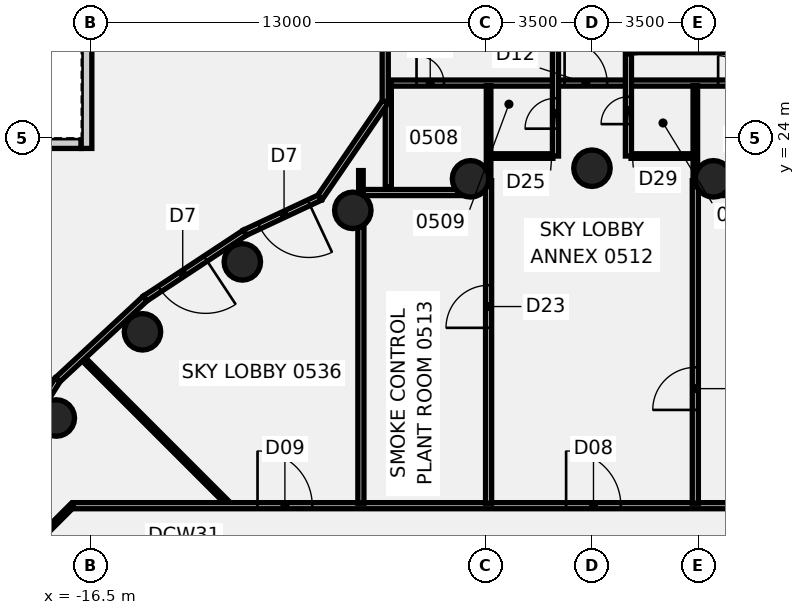
"""IFC4 building model, lengths in metres.
Left out: names, types, materials, properties, quantities, classifications, styles, units other than length and angle.
Written with IfcOpenShell. Run it as: python <this file> out.ifc"""

import sys

from ifc_helpers import new_model, si_unit, direction, frame, frame_2d, origin, origin_2d, place, context, subcontext, project, spatial, rectangle, circle, extrude, element, fill, save


model = new_model("IFC4")
c1 = context("Model", 3, precision=1e-05, world=origin(), true_north=direction((0.0, 1.0)))
c2 = subcontext(c1, "Body", "Model", "MODEL_VIEW")
j1 = project(units=[si_unit("LENGTHUNIT", "METRE"), si_unit("PLANEANGLEUNIT", "RADIAN")], contexts=[c1])
p1 = place(None, origin())
s1 = spatial("IfcSite", under=j1, at=p1, CompositionType="ELEMENT")
p2 = place(p1, origin())
s2 = spatial("IfcBuilding", under=s1, at=p2, CompositionType="ELEMENT")
p3 = place(p2, frame((0.0, 0.0, 29.5)))
s3 = spatial("IfcBuildingStorey", under=s2, at=p3, CompositionType="ELEMENT", Elevation=29.5)
for number, where, z_axis, x_axis in (
    (1, (3.994, 22.651, -0.6), (0.0, 0.0, 1.0), (1.0, 0.0, 0.0)),
    (2, (0.0, 23.0, -0.6), (0.0, 0.0, 1.0), (1.0, 0.0, 0.0)),
    (3, (-3.994, 22.651, -0.6), (0.0, 0.0, 1.0), (1.0, 0.0, 0.0)),
    (4, (-7.866, 21.613, -0.6), (0.0, 0.0, 1.0), (1.0, 0.0, 0.0)),
    (5, (-11.5, 19.919, -0.6), (0.0, 0.0, 1.0), (1.0, 0.0, 0.0)),
    (6, (-14.784, 17.619, -0.6), (0.0, 0.0, 1.0), (1.0, 0.0, 0.0)),
    (7, (-17.619, 14.784, -0.6), (0.0, 0.0, 1.0), (1.0, 0.0, 0.0)),
):
    element("IfcColumn", number, at=place(p3, frame(where, z_axis=z_axis, x_axis=x_axis)), inside=s3, PredefinedType="COLUMN", context=c2, shape_type="SweptSolid", body=[
        extrude(circle(Radius=0.6, at=origin_2d()), origin(), (0.0, 0.0, 1.0), 4.96),
    ])
p4 = place(p3, frame((-16.74, 16.74, 0.0), z_axis=(0.0, 0.0, 1.0), x_axis=(0.707106781187, -0.707106781187, 0.0)))
e8 = element("IfcWall", 8, at=p4, inside=s3, PredefinedType="PARTITIONING", context=c2, shape_type="SweptSolid", body=[
    extrude(rectangle(XDim=6.655, YDim=0.15, at=frame_2d((3.328, 0.0))), origin(), (0.0, 0.0, 1.0), 3.76),
])
p5 = place(p3, frame((-17.065, 11.9, 0.0), z_axis=(0.0, 0.0, 1.0), x_axis=(1.0, 0.0, 0.0)))
e9 = element("IfcWall", 9, at=p5, inside=s3, PredefinedType="PARTITIONING", context=c2, shape_type="SweptSolid", body=[
    extrude(rectangle(XDim=34.165, YDim=0.2, at=frame_2d((17.083, 0.0))), origin(), (0.0, 0.0, 1.0), 3.76),
])
p6 = place(p5, frame((16.215, 0.0, 0.0)))
e10 = element("IfcOpeningElement", 10, at=p6, cuts=e9, PredefinedType="OPENING", context=c2, shape_type="SweptSolid", body=[
    extrude(rectangle(XDim=1.8, YDim=2.1, at=frame_2d((0.9, 1.05))), frame((0.0, 0.11, 0.0), z_axis=(0.0, -1.0, 0.0), x_axis=(1.0, 0.0, 0.0)), (0.0, 0.0, 1.0), 0.22),
])
p7 = place(p5, frame((6.065, 0.0, 0.0)))
e11 = element("IfcOpeningElement", 11, at=p7, cuts=e9, PredefinedType="OPENING", context=c2, shape_type="SweptSolid", body=[
    extrude(rectangle(XDim=1.8, YDim=2.1, at=frame_2d((0.9, 1.05))), frame((0.0, 0.11, 0.0), z_axis=(0.0, -1.0, 0.0), x_axis=(1.0, 0.0, 0.0)), (0.0, 0.0, 1.0), 0.22),
])
p8 = place(p5, frame((31.065, 0.0, 0.0)))
e12 = element("IfcOpeningElement", 12, at=p8, cuts=e9, PredefinedType="OPENING", context=c2, shape_type="SweptSolid", body=[
    extrude(rectangle(XDim=1.8, YDim=2.1, at=frame_2d((0.9, 1.05))), frame((0.0, 0.11, 0.0), z_axis=(0.0, -1.0, 0.0), x_axis=(1.0, 0.0, 0.0)), (0.0, 0.0, 1.0), 0.22),
])
p9 = place(p3, frame((-7.54, 22.2, 0.0), z_axis=(0.0, 0.0, 1.0), x_axis=(1.0, 0.0, 0.0)))
e13 = element("IfcWall", 13, at=p9, inside=s3, PredefinedType="PARTITIONING", context=c2, shape_type="SweptSolid", body=[
    extrude(rectangle(XDim=3.413, YDim=0.2, at=frame_2d((1.707, 0.0))), origin(), (0.0, 0.0, 1.0), 3.76),
])
p10 = place(p3, frame((4.127, 22.2, 0.0), z_axis=(0.0, 0.0, 1.0), x_axis=(1.0, 0.0, 0.0)))
e14 = element("IfcWall", 14, at=p10, inside=s3, PredefinedType="PARTITIONING", context=c2, shape_type="SweptSolid", body=[
    extrude(rectangle(XDim=3.443, YDim=0.2, at=frame_2d((1.722, 0.0))), origin(), (0.0, 0.0, 1.0), 3.76),
])
p11 = place(p3, frame((-6.619, 25.8, 0.0), z_axis=(0.0, 0.0, 1.0), x_axis=(1.0, 0.0, 0.0)))
e15 = element("IfcWall", 15, at=p11, inside=s3, PredefinedType="PARTITIONING", context=c2, shape_type="SweptSolid", body=[
    extrude(rectangle(XDim=13.238, YDim=0.2, at=frame_2d((6.619, 0.0))), origin(), (0.0, 0.0, 1.0), 3.76),
])
p12 = place(p11, frame((5.719, 0.0, 0.0)))
e16 = element("IfcOpeningElement", 16, at=p12, cuts=e15, PredefinedType="OPENING", context=c2, shape_type="SweptSolid", body=[
    extrude(rectangle(XDim=1.4, YDim=2.1, at=frame_2d((0.7, 1.05))), frame((0.0, 0.11, 0.0), z_axis=(0.0, -1.0, 0.0), x_axis=(1.0, 0.0, 0.0)), (0.0, 0.0, 1.0), 0.22),
])
p13 = place(p11, frame((0.849, 0.0, 0.0)))
e17 = element("IfcOpeningElement", 17, at=p13, cuts=e15, PredefinedType="OPENING", context=c2, shape_type="SweptSolid", body=[
    extrude(rectangle(XDim=0.9, YDim=2.1, at=frame_2d((0.45, 1.05))), frame((0.0, 0.11, 0.0), z_axis=(0.0, -1.0, 0.0), x_axis=(1.0, 0.0, 0.0)), (0.0, 0.0, 1.0), 0.22),
])
p14 = place(p11, frame((10.769, 0.0, 0.0)))
e18 = element("IfcOpeningElement", 18, at=p14, cuts=e15, PredefinedType="OPENING", context=c2, shape_type="SweptSolid", body=[
    extrude(rectangle(XDim=0.9, YDim=2.1, at=frame_2d((0.45, 1.05))), frame((0.0, 0.11, 0.0), z_axis=(0.0, -1.0, 0.0), x_axis=(1.0, 0.0, 0.0)), (0.0, 0.0, 1.0), 0.22),
])
for number, where, z_axis, x_axis in (
    (19, (-3.34, 23.4, 0.0), (0.0, 0.0, 1.0), (1.0, 0.0, 0.0)),
    (20, (1.285, 23.4, 0.0), (0.0, 0.0, 1.0), (1.0, 0.0, 0.0)),
):
    element("IfcWall", number, at=place(p3, frame(where, z_axis=z_axis, x_axis=x_axis)), inside=s3, PredefinedType="PARTITIONING", context=c2, shape_type="SweptSolid", body=[
        extrude(rectangle(XDim=2.055, YDim=0.15, at=frame_2d((1.028, 0.0))), origin(), (0.0, 0.0, 1.0), 3.76),
    ])
p15 = place(p3, frame((-18.865, 10.135, 0.0), z_axis=(0.0, 0.0, 1.0), x_axis=(0.707106781187, 0.707106781187, 0.0)))
e21 = element("IfcWall", 21, at=p15, inside=s3, PredefinedType="PARTITIONING", context=c2, shape_type="SweptSolid", body=[
    extrude(rectangle(XDim=2.495, YDim=0.15, at=frame_2d((1.248, 0.0))), origin(), (0.0, 0.0, 1.0), 3.76),
])
p16 = place(p3, frame((-7.6, 11.98, 0.0), z_axis=(0.0, 0.0, 1.0), x_axis=(0.0, 1.0, 0.0)))
e22 = element("IfcWall", 22, at=p16, inside=s3, PredefinedType="PARTITIONING", context=c2, shape_type="SweptSolid", body=[
    extrude(rectangle(XDim=9.094, YDim=0.2, at=frame_2d((4.547, 0.0))), origin(), (0.0, 0.0, 1.0), 3.76),
])
p17 = place(p3, frame((-7.6, 22.152, 0.0), z_axis=(0.0, 0.0, 1.0), x_axis=(0.0, 1.0, 0.0)))
e23 = element("IfcWall", 23, at=p17, inside=s3, PredefinedType="PARTITIONING", context=c2, shape_type="SweptSolid", body=[
    extrude(rectangle(XDim=0.77, YDim=0.15, at=frame_2d((0.385, 0.0))), origin(), (0.0, 0.0, 1.0), 3.76),
])
p18 = place(p3, frame((-3.4, 11.98, 0.0), z_axis=(0.0, 0.0, 1.0), x_axis=(0.0, 1.0, 0.0)))
e24 = element("IfcWall", 24, at=p18, inside=s3, PredefinedType="PARTITIONING", context=c2, shape_type="SweptSolid", body=[
    extrude(rectangle(XDim=10.611, YDim=0.2, at=frame_2d((5.305, 0.0))), origin(), (0.0, 0.0, 1.0), 3.76),
])
p19 = place(p18, frame((5.77, 0.0, 0.0)))
e25 = element("IfcOpeningElement", 25, at=p19, cuts=e24, PredefinedType="OPENING", context=c2, shape_type="SweptSolid", body=[
    extrude(rectangle(XDim=1.4, YDim=2.1, at=frame_2d((0.7, 1.05))), frame((0.0, 0.11, 0.0), z_axis=(0.0, -1.0, 0.0), x_axis=(1.0, 0.0, 0.0)), (0.0, 0.0, 1.0), 0.22),
])
p20 = place(p3, frame((-3.4, 22.711, 0.0), z_axis=(0.0, 0.0, 1.0), x_axis=(0.0, 1.0, 0.0)))
e26 = element("IfcWall", 26, at=p20, inside=s3, PredefinedType="PARTITIONING", context=c2, shape_type="SweptSolid", body=[
    extrude(rectangle(XDim=3.004, YDim=0.15, at=frame_2d((1.502, 0.0))), origin(), (0.0, 0.0, 1.0), 3.76),
])
p21 = place(p3, frame((-1.2, 23.4, 0.0), z_axis=(0.0, 0.0, 1.0), x_axis=(0.0, 1.0, 0.0)))
e27 = element("IfcWall", 27, at=p21, inside=s3, PredefinedType="PARTITIONING", context=c2, shape_type="SweptSolid", body=[
    extrude(rectangle(XDim=15.82, YDim=0.2, at=frame_2d((7.91, 0.0))), origin(), (0.0, 0.0, 1.0), 3.76),
])
p22 = place(p21, frame((0.9, 0.0, 0.0)))
e28 = element("IfcOpeningElement", 28, at=p22, cuts=e27, PredefinedType="OPENING", context=c2, shape_type="SweptSolid", body=[
    extrude(rectangle(XDim=1.0, YDim=2.1, at=frame_2d((0.5, 1.05))), frame((0.0, 0.11, 0.0), z_axis=(0.0, -1.0, 0.0), x_axis=(1.0, 0.0, 0.0)), (0.0, 0.0, 1.0), 0.22),
])
p23 = place(p21, frame((4.95, 0.0, 0.0)))
e29 = element("IfcOpeningElement", 29, at=p23, cuts=e27, PredefinedType="OPENING", context=c2, shape_type="SweptSolid", body=[
    extrude(rectangle(XDim=1.8, YDim=2.1, at=frame_2d((0.9, 1.05))), frame((0.0, 0.11, 0.0), z_axis=(0.0, -1.0, 0.0), x_axis=(1.0, 0.0, 0.0)), (0.0, 0.0, 1.0), 0.22),
])
p24 = place(p21, frame((13.05, 0.0, 0.0)))
e30 = element("IfcOpeningElement", 30, at=p24, cuts=e27, PredefinedType="OPENING", context=c2, shape_type="SweptSolid", body=[
    extrude(rectangle(XDim=1.8, YDim=2.1, at=frame_2d((0.9, 1.05))), frame((0.0, 0.11, 0.0), z_axis=(0.0, -1.0, 0.0), x_axis=(1.0, 0.0, 0.0)), (0.0, 0.0, 1.0), 0.22),
])
p25 = place(p3, frame((1.2, 23.4, 0.0), z_axis=(0.0, 0.0, 1.0), x_axis=(0.0, 1.0, 0.0)))
e31 = element("IfcWall", 31, at=p25, inside=s3, PredefinedType="PARTITIONING", context=c2, shape_type="SweptSolid", body=[
    extrude(rectangle(XDim=3.36, YDim=0.2, at=frame_2d((1.68, 0.0))), origin(), (0.0, 0.0, 1.0), 3.76),
])
p26 = place(p25, frame((1.05, 0.0, 0.0)))
e32 = element("IfcOpeningElement", 32, at=p26, cuts=e31, PredefinedType="OPENING", context=c2, shape_type="SweptSolid", body=[
    extrude(rectangle(XDim=0.9, YDim=2.1, at=frame_2d((0.45, 1.05))), frame((0.0, 0.11, 0.0), z_axis=(0.0, -1.0, 0.0), x_axis=(1.0, 0.0, 0.0)), (0.0, 0.0, 1.0), 0.22),
])
p27 = place(p3, frame((3.4, 11.98, 0.0), z_axis=(0.0, 0.0, 1.0), x_axis=(0.0, 1.0, 0.0)))
e33 = element("IfcWall", 33, at=p27, inside=s3, PredefinedType="PARTITIONING", context=c2, shape_type="SweptSolid", body=[
    extrude(rectangle(XDim=10.611, YDim=0.2, at=frame_2d((5.305, 0.0))), origin(), (0.0, 0.0, 1.0), 3.76),
])
p28 = place(p27, frame((3.07, 0.0, 0.0)))
e34 = element("IfcOpeningElement", 34, at=p28, cuts=e33, PredefinedType="OPENING", context=c2, shape_type="SweptSolid", body=[
    extrude(rectangle(XDim=1.4, YDim=2.1, at=frame_2d((0.7, 1.05))), frame((0.0, 0.11, 0.0), z_axis=(0.0, -1.0, 0.0), x_axis=(1.0, 0.0, 0.0)), (0.0, 0.0, 1.0), 0.22),
])
p29 = place(p3, frame((3.4, 22.711, 0.0), z_axis=(0.0, 0.0, 1.0), x_axis=(0.0, 1.0, 0.0)))
e35 = element("IfcWall", 35, at=p29, inside=s3, PredefinedType="PARTITIONING", context=c2, shape_type="SweptSolid", body=[
    extrude(rectangle(XDim=3.004, YDim=0.15, at=frame_2d((1.502, 0.0))), origin(), (0.0, 0.0, 1.0), 3.76),
])
p30 = place(p3, frame((-6.699, 25.8, 0.0), z_axis=(0.0, 0.0, 1.0), x_axis=(0.0, -1.0, 0.0)))
e36 = element("IfcWall", 36, at=p30, inside=s3, PredefinedType="PARTITIONING", context=c2, shape_type="SweptSolid", body=[
    extrude(rectangle(XDim=3.42, YDim=0.2, at=frame_2d((1.71, 0.0))), origin(), (0.0, 0.0, 1.0), 3.76),
])
p31 = place(p3, frame((-43.5, 23.825, 0.0), z_axis=(0.0, 0.0, 1.0), x_axis=(1.0, 0.0, 0.0)))
e37 = element("IfcWall", 37, at=p31, inside=s3, PredefinedType="SOLIDWALL", context=c2, shape_type="SweptSolid", body=[
    extrude(rectangle(XDim=26.7, YDim=0.35, at=frame_2d((13.35, 0.0))), origin(), (0.0, 0.0, 1.0), 1.2),
])
p32 = place(p3, frame((-16.625, 23.65, 0.0), z_axis=(0.0, 0.0, 1.0), x_axis=(0.0, 1.0, 0.0)))
e38 = element("IfcWall", 38, at=p32, inside=s3, PredefinedType="SOLIDWALL", context=c2, shape_type="SweptSolid", body=[
    extrude(rectangle(XDim=18.7, YDim=0.35, at=frame_2d((9.35, 0.0))), origin(), (0.0, 0.0, 1.0), 1.2),
])
p33 = place(p3, frame((-6.8, 47.481, 0.0), z_axis=(0.0, 0.0, 1.0), x_axis=(0.0, -1.0, 0.0)))
e39 = element("IfcWall", 39, at=p33, inside=s3, PredefinedType="SOLIDWALL", context=c2, shape_type="SweptSolid", body=[
    extrude(rectangle(XDim=22.3, YDim=0.2, at=frame_2d((11.15, 0.0))), origin(), (0.0, 0.0, 1.0), 4.36),
])
p34 = place(p33, frame((3.3, 0.0, 1.4)))
e40 = element("IfcOpeningElement", 40, at=p34, cuts=e39, PredefinedType="OPENING", context=c2, shape_type="SweptSolid", body=[
    extrude(rectangle(XDim=2.4, YDim=2.1, at=frame_2d((1.2, 1.05))), frame((0.0, 0.11, 0.0), z_axis=(0.0, -1.0, 0.0), x_axis=(1.0, 0.0, 0.0)), (0.0, 0.0, 1.0), 0.22),
])
p35 = place(p33, frame((15.85, 0.0, 1.4)))
e41 = element("IfcOpeningElement", 41, at=p35, cuts=e39, PredefinedType="OPENING", context=c2, shape_type="SweptSolid", body=[
    extrude(rectangle(XDim=2.4, YDim=2.1, at=frame_2d((1.2, 1.05))), frame((0.0, 0.11, 0.0), z_axis=(0.0, -1.0, 0.0), x_axis=(1.0, 0.0, 0.0)), (0.0, 0.0, 1.0), 0.22),
])
p36 = place(p33, frame((9.25, 0.0, 1.4)))
e42 = element("IfcOpeningElement", 42, at=p36, cuts=e39, PredefinedType="OPENING", context=c2, shape_type="SweptSolid", body=[
    extrude(rectangle(XDim=2.4, YDim=2.1, at=frame_2d((1.2, 1.05))), frame((0.0, 0.11, 0.0), z_axis=(0.0, -1.0, 0.0), x_axis=(1.0, 0.0, 0.0)), (0.0, 0.0, 1.0), 0.22),
])
p37 = place(p3, frame((-6.8, 25.181, 0.0), z_axis=(0.0, 0.0, 1.0), x_axis=(-0.564050059702, -0.825740594951, 0.0)))
e43 = element("IfcWall", 43, at=p37, inside=s3, PredefinedType="SOLIDWALL", context=c2, shape_type="SweptSolid", body=[
    extrude(rectangle(XDim=3.812, YDim=0.2, at=frame_2d((1.906, 0.0))), origin(), (0.0, 0.0, 1.0), 4.36),
])
p38 = place(p3, frame((-8.95, 22.034, 0.0), z_axis=(0.0, 0.0, 1.0), x_axis=(-0.90557737159, -0.424181121769, 0.0)))
e44 = element("IfcWall", 44, at=p38, inside=s3, PredefinedType="SOLIDWALL", context=c2, shape_type="SweptSolid", body=[
    extrude(rectangle(XDim=2.722, YDim=0.2, at=frame_2d((1.361, 0.0))), origin(), (0.0, 0.0, 1.0), 4.36),
])
p39 = place(p38, frame((0.4, 0.0, 0.0)))
e45 = element("IfcOpeningElement", 45, at=p39, cuts=e44, PredefinedType="OPENING", context=c2, shape_type="SweptSolid", body=[
    extrude(rectangle(XDim=1.8, YDim=2.4, at=frame_2d((0.9, 1.2))), frame((0.0, 0.11, 0.0), z_axis=(0.0, -1.0, 0.0), x_axis=(1.0, 0.0, 0.0)), (0.0, 0.0, 1.0), 0.22),
])
p40 = place(p3, frame((-11.416, 20.879, 0.0), z_axis=(0.0, 0.0, 1.0), x_axis=(-0.834783006394, -0.550579088084, 0.0)))
e46 = element("IfcWall", 46, at=p40, inside=s3, PredefinedType="SOLIDWALL", context=c2, shape_type="SweptSolid", body=[
    extrude(rectangle(XDim=3.93, YDim=0.2, at=frame_2d((1.965, 0.0))), origin(), (0.0, 0.0, 1.0), 4.36),
])
p41 = place(p40, frame((1.55, 0.0, 0.0)))
e47 = element("IfcOpeningElement", 47, at=p41, cuts=e46, PredefinedType="OPENING", context=c2, shape_type="SweptSolid", body=[
    extrude(rectangle(XDim=1.8, YDim=2.4, at=frame_2d((0.9, 1.2))), frame((0.0, 0.11, 0.0), z_axis=(0.0, -1.0, 0.0), x_axis=(1.0, 0.0, 0.0)), (0.0, 0.0, 1.0), 0.22),
])
p42 = place(p3, frame((-14.696, 18.715, 0.0), z_axis=(0.0, 0.0, 1.0), x_axis=(-0.732835527935, -0.680405826691, 0.0)))
e48 = element("IfcWall", 48, at=p42, inside=s3, PredefinedType="SOLIDWALL", context=c2, shape_type="SweptSolid", body=[
    extrude(rectangle(XDim=3.93, YDim=0.2, at=frame_2d((1.965, 0.0))), origin(), (0.0, 0.0, 1.0), 4.36),
])
p43 = place(p3, frame((-17.576, 16.041, 0.0), z_axis=(0.0, 0.0, 1.0), x_axis=(-0.531032707885, -0.847351322154, 0.0)))
e49 = element("IfcWall", 49, at=p43, inside=s3, PredefinedType="SOLIDWALL", context=c2, shape_type="SweptSolid", body=[
    extrude(rectangle(XDim=8.679, YDim=0.2, at=frame_2d((4.34, 0.0))), origin(), (0.0, 0.0, 1.0), 4.36),
])
p44 = place(p3, frame((4.6, 26.9, 0.0), z_axis=(0.0, 0.0, 1.0), x_axis=(-1.0, 0.0, 0.0)))
e50 = element("IfcWall", 50, at=p44, inside=s3, PredefinedType="SHEAR", context=c2, shape_type="SweptSolid", body=[
    extrude(rectangle(XDim=3.2, YDim=0.2, at=frame_2d((1.6, 0.0))), origin(), (0.0, 0.0, 1.0), 3.76),
])
p45 = place(p6, frame((1.8, 0.0, 0.0), z_axis=(0.0, 0.0, 1.0), x_axis=(-1.0, 0.0, 0.0)))
e51 = element("IfcDoor", 51, at=p45, inside=s3, OperationType="DOUBLE_DOOR_SINGLE_SWING", PredefinedType="DOOR", context=c2, shape_type="SweptSolid", body=[
    extrude(rectangle(XDim=1.8, YDim=2.1, at=frame_2d((0.9, 1.05))), frame((0.0, 0.025, 0.0), z_axis=(0.0, -1.0, 0.0), x_axis=(1.0, 0.0, 0.0)), (0.0, 0.0, 1.0), 0.05),
])
fill(e10, e51)
p46 = place(p7, frame((1.8, 0.0, 0.0), z_axis=(0.0, 0.0, 1.0), x_axis=(-1.0, 0.0, 0.0)))
e52 = element("IfcDoor", 52, at=p46, inside=s3, OperationType="DOUBLE_DOOR_SINGLE_SWING", PredefinedType="DOOR", context=c2, shape_type="SweptSolid", body=[
    extrude(rectangle(XDim=1.8, YDim=2.1, at=frame_2d((0.9, 1.05))), frame((0.0, 0.025, 0.0), z_axis=(0.0, -1.0, 0.0), x_axis=(1.0, 0.0, 0.0)), (0.0, 0.0, 1.0), 0.05),
])
fill(e11, e52)
p47 = place(p12, frame((1.4, 0.0, 0.0), z_axis=(0.0, 0.0, 1.0), x_axis=(-1.0, 0.0, 0.0)))
e53 = element("IfcDoor", 53, at=p47, inside=s3, OperationType="DOUBLE_DOOR_SINGLE_SWING", PredefinedType="DOOR", context=c2, shape_type="SweptSolid", body=[
    extrude(rectangle(XDim=1.4, YDim=2.1, at=frame_2d((0.7, 1.05))), frame((0.0, 0.025, 0.0), z_axis=(0.0, -1.0, 0.0), x_axis=(1.0, 0.0, 0.0)), (0.0, 0.0, 1.0), 0.05),
])
fill(e16, e53)
p48 = place(p13, frame((0.9, 0.0, 0.0), z_axis=(0.0, 0.0, 1.0), x_axis=(-1.0, 0.0, 0.0)))
e54 = element("IfcDoor", 54, at=p48, inside=s3, OperationType="SINGLE_SWING_LEFT", PredefinedType="DOOR", context=c2, shape_type="SweptSolid", body=[
    extrude(rectangle(XDim=0.9, YDim=2.1, at=frame_2d((0.45, 1.05))), frame((0.0, 0.025, 0.0), z_axis=(0.0, -1.0, 0.0), x_axis=(1.0, 0.0, 0.0)), (0.0, 0.0, 1.0), 0.05),
])
fill(e17, e54)
p49 = place(p14, frame((0.9, 0.0, 0.0), z_axis=(0.0, 0.0, 1.0), x_axis=(-1.0, 0.0, 0.0)))
e55 = element("IfcDoor", 55, at=p49, inside=s3, OperationType="SINGLE_SWING_RIGHT", PredefinedType="DOOR", context=c2, shape_type="SweptSolid", body=[
    extrude(rectangle(XDim=0.9, YDim=2.1, at=frame_2d((0.45, 1.05))), frame((0.0, 0.025, 0.0), z_axis=(0.0, -1.0, 0.0), x_axis=(1.0, 0.0, 0.0)), (0.0, 0.0, 1.0), 0.05),
])
fill(e18, e55)
p50 = place(p19, origin())
e56 = element("IfcDoor", 56, at=p50, inside=s3, OperationType="DOUBLE_DOOR_SINGLE_SWING", PredefinedType="DOOR", context=c2, shape_type="SweptSolid", body=[
    extrude(rectangle(XDim=1.4, YDim=2.1, at=frame_2d((0.7, 1.05))), frame((0.0, 0.025, 0.0), z_axis=(0.0, -1.0, 0.0), x_axis=(1.0, 0.0, 0.0)), (0.0, 0.0, 1.0), 0.05),
])
fill(e25, e56)
p51 = place(p22, origin())
e57 = element("IfcDoor", 57, at=p51, inside=s3, OperationType="SINGLE_SWING_RIGHT", PredefinedType="DOOR", context=c2, shape_type="SweptSolid", body=[
    extrude(rectangle(XDim=1.0, YDim=2.1, at=frame_2d((0.5, 1.05))), frame((0.0, 0.025, 0.0), z_axis=(0.0, -1.0, 0.0), x_axis=(1.0, 0.0, 0.0)), (0.0, 0.0, 1.0), 0.05),
])
fill(e28, e57)
p52 = place(p26, frame((0.9, 0.0, 0.0), z_axis=(0.0, 0.0, 1.0), x_axis=(-1.0, 0.0, 0.0)))
e58 = element("IfcDoor", 58, at=p52, inside=s3, OperationType="SINGLE_SWING_LEFT", PredefinedType="DOOR", context=c2, shape_type="SweptSolid", body=[
    extrude(rectangle(XDim=0.9, YDim=2.1, at=frame_2d((0.45, 1.05))), frame((0.0, 0.025, 0.0), z_axis=(0.0, -1.0, 0.0), x_axis=(1.0, 0.0, 0.0)), (0.0, 0.0, 1.0), 0.05),
])
fill(e32, e58)
p53 = place(p28, frame((1.4, 0.0, 0.0), z_axis=(0.0, 0.0, 1.0), x_axis=(-1.0, 0.0, 0.0)))
e59 = element("IfcDoor", 59, at=p53, inside=s3, OperationType="DOUBLE_DOOR_SINGLE_SWING", PredefinedType="DOOR", context=c2, shape_type="SweptSolid", body=[
    extrude(rectangle(XDim=1.4, YDim=2.1, at=frame_2d((0.7, 1.05))), frame((0.0, 0.025, 0.0), z_axis=(0.0, -1.0, 0.0), x_axis=(1.0, 0.0, 0.0)), (0.0, 0.0, 1.0), 0.05),
])
fill(e34, e59)
p54 = place(p41, frame((1.8, 0.0, 0.0), z_axis=(0.0, 0.0, 1.0), x_axis=(-1.0, 0.0, 0.0)))
e60 = element("IfcDoor", 60, at=p54, inside=s3, OperationType="DOUBLE_DOOR_SINGLE_SWING", PredefinedType="DOOR", context=c2, shape_type="SweptSolid", body=[
    extrude(rectangle(XDim=1.8, YDim=2.4, at=frame_2d((0.9, 1.2))), frame((0.0, 0.025, 0.0), z_axis=(0.0, -1.0, 0.0), x_axis=(1.0, 0.0, 0.0)), (0.0, 0.0, 1.0), 0.05),
])
fill(e47, e60)
p55 = place(p39, frame((1.8, 0.0, 0.0), z_axis=(0.0, 0.0, 1.0), x_axis=(-1.0, 0.0, 0.0)))
e61 = element("IfcDoor", 61, at=p55, inside=s3, OperationType="DOUBLE_DOOR_SINGLE_SWING", PredefinedType="DOOR", context=c2, shape_type="SweptSolid", body=[
    extrude(rectangle(XDim=1.8, YDim=2.4, at=frame_2d((0.9, 1.2))), frame((0.0, 0.025, 0.0), z_axis=(0.0, -1.0, 0.0), x_axis=(1.0, 0.0, 0.0)), (0.0, 0.0, 1.0), 0.05),
])
fill(e45, e61)
save(model, sys.argv[1])
